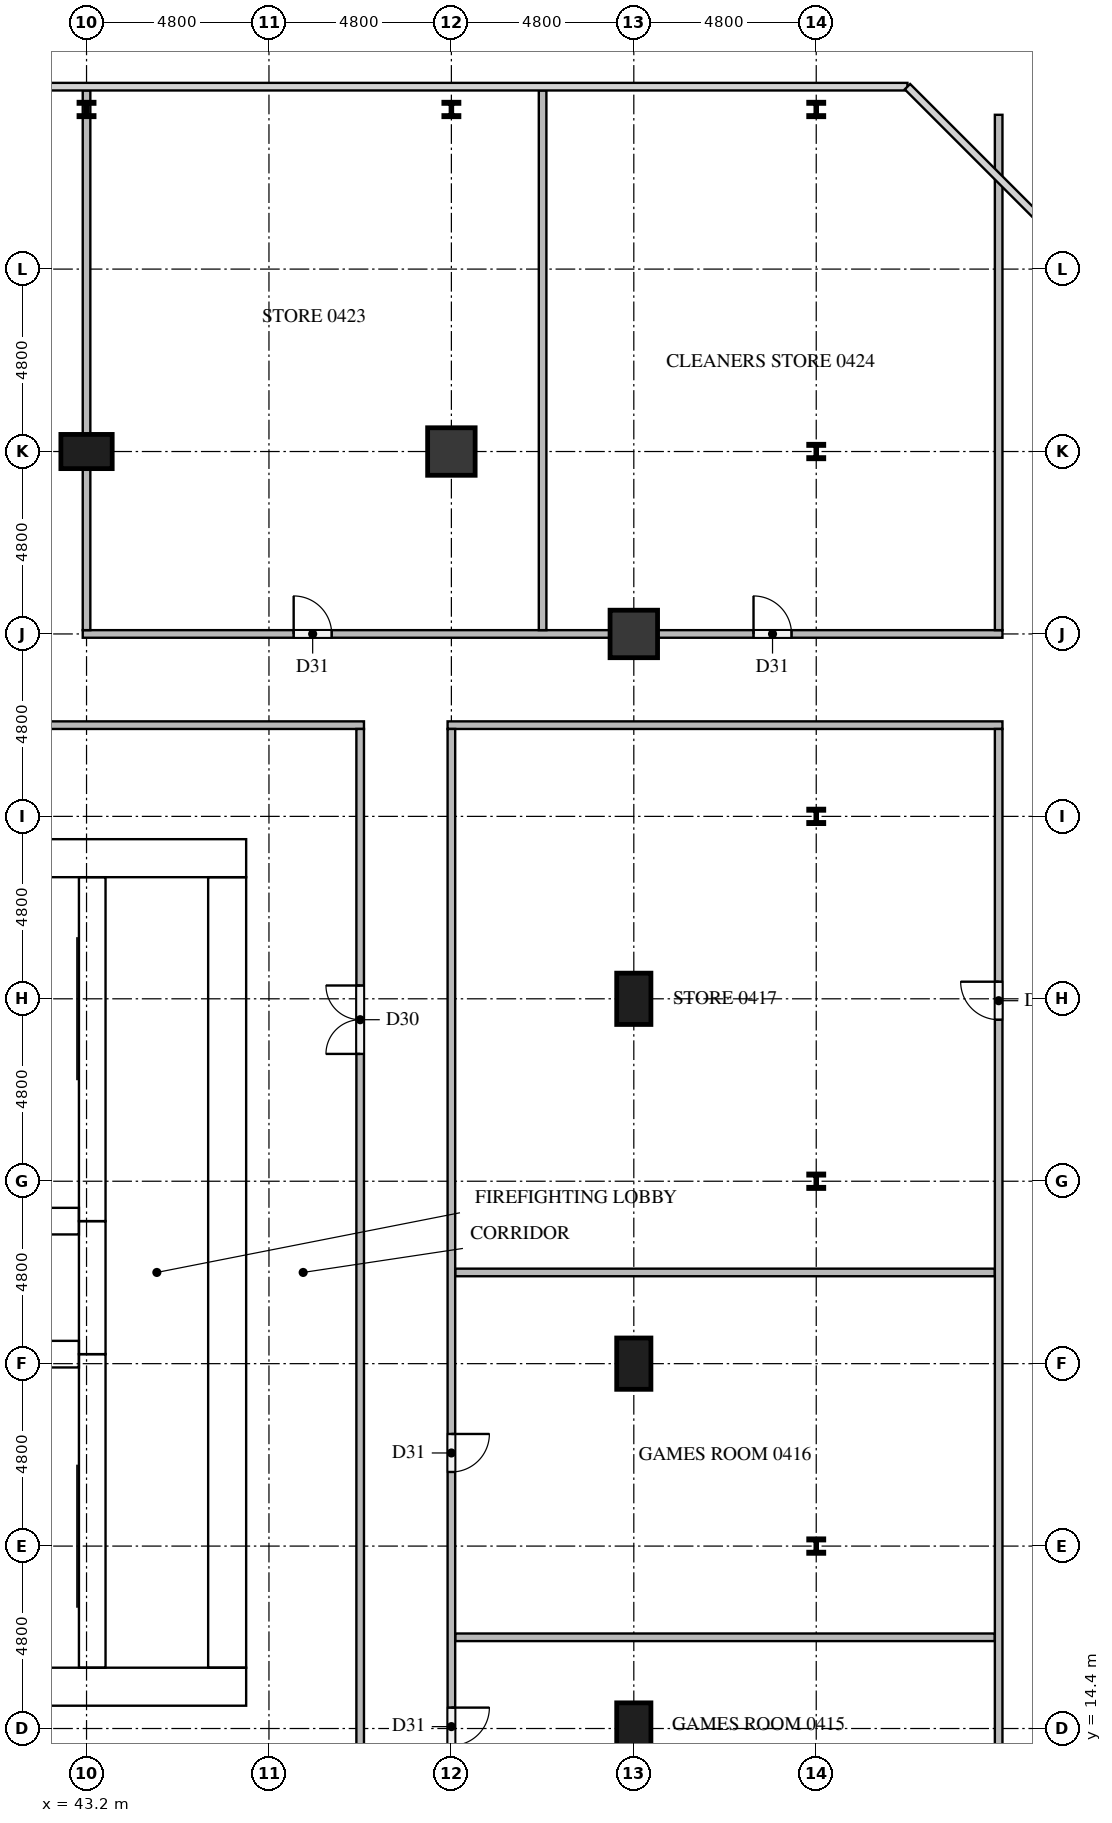
"""IFC4 building model, lengths in metres.
Left out: names, types, materials, properties, quantities, classifications, styles, units other than length and angle.
Written with IfcOpenShell. Run it as: python <this file> out.ifc"""

import sys

from ifc_helpers import new_model, si_unit, direction, frame, frame_2d, origin, origin_2d, place, context, subcontext, project, spatial, rectangle, i_section, extrude, element, fill, save


model = new_model("IFC4")
c1 = context("Model", 3, precision=1e-05, world=origin(), true_north=direction((0.0, 1.0)))
c2 = subcontext(c1, "Body", "Model", "MODEL_VIEW")
j1 = project(units=[si_unit("LENGTHUNIT", "METRE"), si_unit("PLANEANGLEUNIT", "RADIAN")], contexts=[c1])
p1 = place(None, origin())
s1 = spatial("IfcSite", under=j1, at=p1, CompositionType="ELEMENT")
p2 = place(p1, origin())
s2 = spatial("IfcBuilding", under=s1, at=p2, CompositionType="ELEMENT")
p3 = place(p2, frame((0.0, 0.0, 19.5)))
s3 = spatial("IfcBuildingStorey", under=s2, at=p3, CompositionType="ELEMENT", Elevation=19.5)
p4 = place(p3, frame((15.0, 15.5, 0.0), z_axis=(0.0, 0.0, 1.0), x_axis=(1.0, 0.0, 0.0)))
e1 = element("IfcWall", 1, at=p4, inside=s3, PredefinedType="SHEAR", context=c2, shape_type="SweptSolid", body=[
    extrude(rectangle(XDim=32.4, YDim=1.0, at=frame_2d((16.2, 0.0))), origin(), (0.0, 0.0, 1.0), 4.1),
])
p5 = place(p4, frame((15.3, 0.0, 0.0)))
e2 = element("IfcOpeningElement", 2, at=p5, cuts=e1, PredefinedType="OPENING", context=c2, shape_type="SweptSolid", body=[
    extrude(rectangle(XDim=1.8, YDim=2.1, at=frame_2d((0.9, 1.05))), frame((0.0, 0.51, 0.0), z_axis=(0.0, -1.0, 0.0), x_axis=(1.0, 0.0, 0.0)), (0.0, 0.0, 1.0), 1.02),
])
p6 = place(p3, frame((15.0, 37.3, 0.0), z_axis=(0.0, 0.0, 1.0), x_axis=(1.0, 0.0, 0.0)))
e3 = element("IfcWall", 3, at=p6, inside=s3, PredefinedType="SHEAR", context=c2, shape_type="SweptSolid", body=[
    extrude(rectangle(XDim=32.4, YDim=1.0, at=frame_2d((16.2, 0.0))), origin(), (0.0, 0.0, 1.0), 4.1),
])
p7 = place(p6, frame((15.3, 0.0, 0.0)))
e4 = element("IfcOpeningElement", 4, at=p7, cuts=e3, PredefinedType="OPENING", context=c2, shape_type="SweptSolid", body=[
    extrude(rectangle(XDim=1.8, YDim=2.1, at=frame_2d((0.9, 1.05))), frame((0.0, 0.51, 0.0), z_axis=(0.0, -1.0, 0.0), x_axis=(1.0, 0.0, 0.0)), (0.0, 0.0, 1.0), 1.02),
])
p8 = place(p6, frame((1.766, 0.0, 0.0)))
e5 = element("IfcOpeningElement", 5, at=p8, cuts=e3, PredefinedType="OPENING", context=c2, shape_type="SweptSolid", body=[
    extrude(rectangle(XDim=1.0, YDim=2.1, at=frame_2d((0.5, 1.05))), frame((0.0, 0.51, 0.0), z_axis=(0.0, -1.0, 0.0), x_axis=(1.0, 0.0, 0.0)), (0.0, 0.0, 1.0), 1.02),
])
p9 = place(p6, frame((5.241, 0.0, 0.0)))
e6 = element("IfcOpeningElement", 6, at=p9, cuts=e3, PredefinedType="OPENING", context=c2, shape_type="SweptSolid", body=[
    extrude(rectangle(XDim=1.0, YDim=2.1, at=frame_2d((0.5, 1.05))), frame((0.0, 0.51, 0.0), z_axis=(0.0, -1.0, 0.0), x_axis=(1.0, 0.0, 0.0)), (0.0, 0.0, 1.0), 1.02),
])
p10 = place(p3, frame((46.9, 16.0, 0.0), z_axis=(0.0, 0.0, 1.0), x_axis=(0.0, 1.0, 0.0)))
e7 = element("IfcWall", 7, at=p10, inside=s3, PredefinedType="SHEAR", context=c2, shape_type="SweptSolid", body=[
    extrude(rectangle(XDim=20.8, YDim=1.0, at=frame_2d((10.4, 0.0))), origin(), (0.0, 0.0, 1.0), 4.1),
])
p11 = place(p10, frame((10.1, 0.0, 0.0)))
e8 = element("IfcOpeningElement", 8, at=p11, cuts=e7, PredefinedType="OPENING", context=c2, shape_type="SweptSolid", body=[
    extrude(rectangle(XDim=1.2, YDim=2.1, at=frame_2d((0.6, 1.05))), frame((0.0, 0.51, 0.0), z_axis=(0.0, -1.0, 0.0), x_axis=(1.0, 0.0, 0.0)), (0.0, 0.0, 1.0), 1.02),
])
p12 = place(p3, frame((43.35, 16.0, 0.0), z_axis=(0.0, 0.0, 1.0), x_axis=(0.0, 1.0, 0.0)))
e9 = element("IfcWall", 9, at=p12, inside=s3, PredefinedType="SHEAR", context=c2, shape_type="SweptSolid", body=[
    extrude(rectangle(XDim=8.25, YDim=0.7, at=frame_2d((4.125, 0.0))), origin(), (0.0, 0.0, 1.0), 4.1),
])
p13 = place(p12, frame((0.2, 0.0, 0.0)))
e10 = element("IfcOpeningElement", 10, at=p13, cuts=e9, PredefinedType="OPENING", context=c2, shape_type="SweptSolid", body=[
    extrude(rectangle(XDim=1.2, YDim=2.1, at=frame_2d((0.6, 1.05))), frame((0.0, 0.36, 0.0), z_axis=(0.0, -1.0, 0.0), x_axis=(1.0, 0.0, 0.0)), (0.0, 0.0, 1.0), 0.72),
])
p14 = place(p3, frame((43.35, 24.25, 0.0), z_axis=(0.0, 0.0, 1.0), x_axis=(0.0, 1.0, 0.0)))
e11 = element("IfcWall", 11, at=p14, inside=s3, PredefinedType="SHEAR", context=c2, shape_type="SweptSolid", body=[
    extrude(rectangle(XDim=3.5, YDim=0.7, at=frame_2d((1.75, 0.0))), origin(), (0.0, 0.0, 1.0), 4.1),
])
p15 = place(p14, frame((1.2, 0.0, 0.0)))
e12 = element("IfcOpeningElement", 12, at=p15, cuts=e11, PredefinedType="OPENING", context=c2, shape_type="SweptSolid", body=[
    extrude(rectangle(XDim=1.1, YDim=2.1, at=frame_2d((0.55, 1.05))), frame((0.0, 0.36, 0.0), z_axis=(0.0, -1.0, 0.0), x_axis=(1.0, 0.0, 0.0)), (0.0, 0.0, 1.0), 0.72),
])
p16 = place(p3, frame((43.35, 27.75, 0.0), z_axis=(0.0, 0.0, 1.0), x_axis=(0.0, 1.0, 0.0)))
e13 = element("IfcWall", 13, at=p16, inside=s3, PredefinedType="SHEAR", context=c2, shape_type="SweptSolid", body=[
    extrude(rectangle(XDim=9.05, YDim=0.7, at=frame_2d((4.525, 0.0))), origin(), (0.0, 0.0, 1.0), 4.1),
])
p17 = place(p16, frame((7.65, 0.0, 0.0)))
e14 = element("IfcOpeningElement", 14, at=p17, cuts=e13, PredefinedType="OPENING", context=c2, shape_type="SweptSolid", body=[
    extrude(rectangle(XDim=1.2, YDim=2.1, at=frame_2d((0.6, 1.05))), frame((0.0, 0.36, 0.0), z_axis=(0.0, -1.0, 0.0), x_axis=(1.0, 0.0, 0.0)), (0.0, 0.0, 1.0), 0.72),
])
for number, where, z_axis, x_axis in (
    (15, (39.65, 24.25, 0.0), (0.0, 0.0, 1.0), (1.0, 0.0, 0.0)),
    (16, (39.65, 27.75, 0.0), (0.0, 0.0, 1.0), (1.0, 0.0, 0.0)),
):
    element("IfcWall", number, at=place(p3, frame(where, z_axis=z_axis, x_axis=x_axis)), inside=s3, PredefinedType="SHEAR", context=c2, shape_type="SweptSolid", body=[
        extrude(rectangle(XDim=3.35, YDim=0.7, at=frame_2d((1.675, 0.0))), origin(), (0.0, 0.0, 1.0), 4.1),
    ])
for number, where, z_axis, x_axis in (
    (17, (57.6, 14.4, 0.0), (0.0, 0.0, 1.0), (0.0, 1.0, 0.0)),
    (18, (57.6, 24.0, 0.0), (0.0, 0.0, 1.0), (0.0, 1.0, 0.0)),
    (19, (57.6, 33.6, 0.0), (0.0, 0.0, 1.0), (0.0, 1.0, 0.0)),
):
    element("IfcColumn", number, at=place(p3, frame(where, z_axis=z_axis, x_axis=x_axis)), inside=s3, PredefinedType="COLUMN", context=c2, shape_type="SweptSolid", body=[
        extrude(rectangle(XDim=1.35, YDim=0.9, at=origin_2d()), origin(), (0.0, 0.0, 1.0), 4.1),
    ])
for number, where, z_axis, x_axis in (
    (20, (57.6, 43.2, 0.0), (0.0, 0.0, 1.0), (1.0, 0.0, 0.0)),
    (21, (52.8, 48.0, 0.0), (0.0, 0.0, 1.0), (1.0, 0.0, 0.0)),
):
    element("IfcColumn", number, at=place(p3, frame(where, z_axis=z_axis, x_axis=x_axis)), inside=s3, PredefinedType="COLUMN", context=c2, shape_type="SweptSolid", body=[
        extrude(rectangle(XDim=1.25, YDim=1.25, at=origin_2d()), origin(), (0.0, 0.0, 1.0), 4.1),
    ])
p18 = place(p3, frame((43.2, 48.0, 0.0), z_axis=(0.0, 0.0, 1.0), x_axis=(1.0, 0.0, 0.0)))
e22 = element("IfcColumn", 22, at=p18, inside=s3, PredefinedType="COLUMN", context=c2, shape_type="SweptSolid", body=[
    extrude(rectangle(XDim=1.35, YDim=0.9, at=origin_2d()), origin(), (0.0, 0.0, 1.0), 4.1),
])
for number, where, z_axis, x_axis in (
    (23, (43.2, 57.0, 0.0), (0.0, 0.0, 1.0), (1.0, 0.0, 0.0)),
    (24, (52.8, 57.0, 0.0), (0.0, 0.0, 1.0), (1.0, 0.0, 0.0)),
    (25, (62.4, 19.2, 0.0), (0.0, 0.0, 1.0), (1.0, 0.0, 0.0)),
    (26, (62.4, 28.8, 0.0), (0.0, 0.0, 1.0), (1.0, 0.0, 0.0)),
    (27, (62.4, 38.4, 0.0), (0.0, 0.0, 1.0), (1.0, 0.0, 0.0)),
    (28, (62.4, 48.0, 0.0), (0.0, 0.0, 1.0), (1.0, 0.0, 0.0)),
    (29, (62.4, 57.0, 0.0), (0.0, 0.0, 1.0), (1.0, 0.0, 0.0)),
):
    element("IfcColumn", number, at=place(p3, frame(where, z_axis=z_axis, x_axis=x_axis)), inside=s3, PredefinedType="COLUMN", context=c2, shape_type="SweptSolid", body=[
        extrude(i_section(OverallWidth=0.396, OverallDepth=0.381, WebThickness=0.019, FlangeThickness=0.03, at=origin_2d()), origin(), (0.0, 0.0, 1.0), 4.1),
    ])
for number, where, z_axis, x_axis in (
    (30, (52.9, 16.8, 0.0), (0.0, 0.0, 1.0), (1.0, 0.0, 0.0)),
    (31, (52.9, 26.4, 0.0), (0.0, 0.0, 1.0), (1.0, 0.0, 0.0)),
):
    element("IfcWall", number, at=place(p3, frame(where, z_axis=z_axis, x_axis=x_axis)), inside=s3, PredefinedType="PARTITIONING", context=c2, shape_type="SweptSolid", body=[
        extrude(rectangle(XDim=14.2, YDim=0.2, at=frame_2d((7.1, 0.0))), origin(), (0.0, 0.0, 1.0), 4.1),
    ])
p19 = place(p3, frame((50.5, 40.8, 0.0), z_axis=(0.0, 0.0, 1.0), x_axis=(-1.0, 0.0, 0.0)))
e32 = element("IfcWall", 32, at=p19, inside=s3, PredefinedType="PARTITIONING", context=c2, shape_type="SweptSolid", body=[
    extrude(rectangle(XDim=38.6, YDim=0.2, at=frame_2d((19.3, 0.0))), origin(), (0.0, 0.0, 1.0), 4.1),
])
p20 = place(p19, frame((18.45, 0.0, 0.0)))
e33 = element("IfcOpeningElement", 33, at=p20, cuts=e32, PredefinedType="OPENING", context=c2, shape_type="SweptSolid", body=[
    extrude(rectangle(XDim=1.8, YDim=2.1, at=frame_2d((0.9, 1.05))), frame((0.0, 0.11, 0.0), z_axis=(0.0, -1.0, 0.0), x_axis=(1.0, 0.0, 0.0)), (0.0, 0.0, 1.0), 0.22),
])
p21 = place(p19, frame((16.25, 0.0, 0.0)))
e34 = element("IfcOpeningElement", 34, at=p21, cuts=e32, PredefinedType="OPENING", context=c2, shape_type="SweptSolid", body=[
    extrude(rectangle(XDim=1.8, YDim=2.1, at=frame_2d((0.9, 1.05))), frame((0.0, 0.11, 0.0), z_axis=(0.0, -1.0, 0.0), x_axis=(1.0, 0.0, 0.0)), (0.0, 0.0, 1.0), 0.22),
])
p22 = place(p3, frame((52.7, 40.8, 0.0), z_axis=(0.0, 0.0, 1.0), x_axis=(1.0, 0.0, 0.0)))
e35 = element("IfcWall", 35, at=p22, inside=s3, PredefinedType="PARTITIONING", context=c2, shape_type="SweptSolid", body=[
    extrude(rectangle(XDim=14.6, YDim=0.2, at=frame_2d((7.3, 0.0))), origin(), (0.0, 0.0, 1.0), 4.1),
])
p23 = place(p3, frame((43.1, 43.2, 0.0), z_axis=(0.0, 0.0, 1.0), x_axis=(1.0, 0.0, 0.0)))
e36 = element("IfcWall", 36, at=p23, inside=s3, PredefinedType="PARTITIONING", context=c2, shape_type="SweptSolid", body=[
    extrude(rectangle(XDim=24.2, YDim=0.2, at=frame_2d((12.1, 0.0))), origin(), (0.0, 0.0, 1.0), 4.1),
])
p24 = place(p23, frame((5.55, 0.0, 0.0)))
e37 = element("IfcOpeningElement", 37, at=p24, cuts=e36, PredefinedType="OPENING", context=c2, shape_type="SweptSolid", body=[
    extrude(rectangle(XDim=1.0, YDim=2.1, at=frame_2d((0.5, 1.05))), frame((0.0, 0.11, 0.0), z_axis=(0.0, -1.0, 0.0), x_axis=(1.0, 0.0, 0.0)), (0.0, 0.0, 1.0), 0.22),
])
p25 = place(p23, frame((17.65, 0.0, 0.0)))
e38 = element("IfcOpeningElement", 38, at=p25, cuts=e36, PredefinedType="OPENING", context=c2, shape_type="SweptSolid", body=[
    extrude(rectangle(XDim=1.0, YDim=2.1, at=frame_2d((0.5, 1.05))), frame((0.0, 0.11, 0.0), z_axis=(0.0, -1.0, 0.0), x_axis=(1.0, 0.0, 0.0)), (0.0, 0.0, 1.0), 0.22),
])
p26 = place(p3, frame((43.2, 43.3, 0.0), z_axis=(0.0, 0.0, 1.0), x_axis=(0.0, 1.0, 0.0)))
e39 = element("IfcWall", 39, at=p26, inside=s3, PredefinedType="PARTITIONING", context=c2, shape_type="SweptSolid", body=[
    extrude(rectangle(XDim=14.2, YDim=0.2, at=frame_2d((7.1, 0.0))), origin(), (0.0, 0.0, 1.0), 4.1),
])
p27 = place(p3, frame((50.4, 12.1, 0.0), z_axis=(0.0, 0.0, 1.0), x_axis=(0.0, 1.0, 0.0)))
e40 = element("IfcWall", 40, at=p27, inside=s3, PredefinedType="PARTITIONING", context=c2, shape_type="SweptSolid", body=[
    extrude(rectangle(XDim=28.6, YDim=0.2, at=frame_2d((14.3, 0.0))), origin(), (0.0, 0.0, 1.0), 4.1),
])
p28 = place(p27, frame((20.05, 0.0, 0.0)))
e41 = element("IfcOpeningElement", 41, at=p28, cuts=e40, PredefinedType="OPENING", context=c2, shape_type="SweptSolid", body=[
    extrude(rectangle(XDim=1.8, YDim=2.1, at=frame_2d((0.9, 1.05))), frame((0.0, 0.11, 0.0), z_axis=(0.0, -1.0, 0.0), x_axis=(1.0, 0.0, 0.0)), (0.0, 0.0, 1.0), 0.22),
])
p29 = place(p3, frame((52.8, 40.7, 0.0), z_axis=(0.0, 0.0, 1.0), x_axis=(0.0, -1.0, 0.0)))
e42 = element("IfcWall", 42, at=p29, inside=s3, PredefinedType="PARTITIONING", context=c2, shape_type="SweptSolid", body=[
    extrude(rectangle(XDim=28.6, YDim=0.2, at=frame_2d((14.3, 0.0))), origin(), (0.0, 0.0, 1.0), 4.1),
])
p30 = place(p29, frame((25.75, 0.0, 0.0)))
e43 = element("IfcOpeningElement", 43, at=p30, cuts=e42, PredefinedType="OPENING", context=c2, shape_type="SweptSolid", body=[
    extrude(rectangle(XDim=1.0, YDim=2.1, at=frame_2d((0.5, 1.05))), frame((0.0, 0.11, 0.0), z_axis=(0.0, -1.0, 0.0), x_axis=(1.0, 0.0, 0.0)), (0.0, 0.0, 1.0), 0.22),
])
p31 = place(p29, frame((18.55, 0.0, 0.0)))
e44 = element("IfcOpeningElement", 44, at=p31, cuts=e42, PredefinedType="OPENING", context=c2, shape_type="SweptSolid", body=[
    extrude(rectangle(XDim=1.0, YDim=2.1, at=frame_2d((0.5, 1.05))), frame((0.0, 0.11, 0.0), z_axis=(0.0, -1.0, 0.0), x_axis=(1.0, 0.0, 0.0)), (0.0, 0.0, 1.0), 0.22),
])
p32 = place(p3, frame((55.2, 43.3, 0.0), z_axis=(0.0, 0.0, 1.0), x_axis=(0.0, 1.0, 0.0)))
e45 = element("IfcWall", 45, at=p32, inside=s3, PredefinedType="PARTITIONING", context=c2, shape_type="SweptSolid", body=[
    extrude(rectangle(XDim=14.2, YDim=0.2, at=frame_2d((7.1, 0.0))), origin(), (0.0, 0.0, 1.0), 4.1),
])
p33 = place(p3, frame((67.2, 12.4, 0.0), z_axis=(0.0, 0.0, 1.0), x_axis=(0.0, 1.0, 0.0)))
e46 = element("IfcWall", 46, at=p33, inside=s3, PredefinedType="PARTITIONING", context=c2, shape_type="SweptSolid", body=[
    extrude(rectangle(XDim=28.3, YDim=0.2, at=frame_2d((14.15, 0.0))), origin(), (0.0, 0.0, 1.0), 4.1),
])
p34 = place(p33, frame((20.65, 0.0, 0.0)))
e47 = element("IfcOpeningElement", 47, at=p34, cuts=e46, PredefinedType="OPENING", context=c2, shape_type="SweptSolid", body=[
    extrude(rectangle(XDim=1.0, YDim=2.1, at=frame_2d((0.5, 1.05))), frame((0.0, 0.11, 0.0), z_axis=(0.0, -1.0, 0.0), x_axis=(1.0, 0.0, 0.0)), (0.0, 0.0, 1.0), 0.22),
])
p35 = place(p3, frame((67.2, 43.3, 0.0), z_axis=(0.0, 0.0, 1.0), x_axis=(0.0, 1.0, 0.0)))
e48 = element("IfcWall", 48, at=p35, inside=s3, PredefinedType="PARTITIONING", context=c2, shape_type="SweptSolid", body=[
    extrude(rectangle(XDim=13.56, YDim=0.2, at=frame_2d((6.78, 0.0))), origin(), (0.0, 0.0, 1.0), 4.1),
])
p36 = place(p15, origin())
e49 = element("IfcDoor", 49, at=p36, inside=s3, OperationType="DOUBLE_DOOR_SLIDING", PredefinedType="DOOR", context=c2, shape_type="SweptSolid", body=[
    extrude(rectangle(XDim=1.1, YDim=2.1, at=frame_2d((0.55, 1.05))), frame((0.0, 0.025, 0.0), z_axis=(0.0, -1.0, 0.0), x_axis=(1.0, 0.0, 0.0)), (0.0, 0.0, 1.0), 0.05),
])
fill(e12, e49)
p37 = place(p13, origin())
e50 = element("IfcDoor", 50, at=p37, inside=s3, OperationType="SINGLE_SWING_LEFT", PredefinedType="DOOR", context=c2, shape_type="SweptSolid", body=[
    extrude(rectangle(XDim=1.2, YDim=2.1, at=frame_2d((0.6, 1.05))), frame((0.0, 0.025, 0.0), z_axis=(0.0, -1.0, 0.0), x_axis=(1.0, 0.0, 0.0)), (0.0, 0.0, 1.0), 0.05),
])
fill(e10, e50)
p38 = place(p17, origin())
e51 = element("IfcDoor", 51, at=p38, inside=s3, OperationType="SINGLE_SWING_RIGHT", PredefinedType="DOOR", context=c2, shape_type="SweptSolid", body=[
    extrude(rectangle(XDim=1.2, YDim=2.1, at=frame_2d((0.6, 1.05))), frame((0.0, 0.025, 0.0), z_axis=(0.0, -1.0, 0.0), x_axis=(1.0, 0.0, 0.0)), (0.0, 0.0, 1.0), 0.05),
])
fill(e14, e51)
p39 = place(p11, origin())
e52 = element("IfcDoor", 52, at=p39, inside=s3, OperationType="SINGLE_SWING_RIGHT", PredefinedType="DOOR", context=c2, shape_type="SweptSolid", body=[
    extrude(rectangle(XDim=1.2, YDim=2.1, at=frame_2d((0.6, 1.05))), frame((0.0, 0.025, 0.0), z_axis=(0.0, -1.0, 0.0), x_axis=(1.0, 0.0, 0.0)), (0.0, 0.0, 1.0), 0.05),
])
fill(e8, e52)
p40 = place(p30, origin())
e53 = element("IfcDoor", 53, at=p40, inside=s3, OperationType="SINGLE_SWING_LEFT", PredefinedType="DOOR", context=c2, shape_type="SweptSolid", body=[
    extrude(rectangle(XDim=1.0, YDim=2.1, at=frame_2d((0.5, 1.05))), frame((0.0, 0.025, 0.0), z_axis=(0.0, -1.0, 0.0), x_axis=(1.0, 0.0, 0.0)), (0.0, 0.0, 1.0), 0.05),
])
fill(e43, e53)
p41 = place(p31, origin())
e54 = element("IfcDoor", 54, at=p41, inside=s3, OperationType="SINGLE_SWING_LEFT", PredefinedType="DOOR", context=c2, shape_type="SweptSolid", body=[
    extrude(rectangle(XDim=1.0, YDim=2.1, at=frame_2d((0.5, 1.05))), frame((0.0, 0.025, 0.0), z_axis=(0.0, -1.0, 0.0), x_axis=(1.0, 0.0, 0.0)), (0.0, 0.0, 1.0), 0.05),
])
fill(e44, e54)
p42 = place(p34, origin())
e55 = element("IfcDoor", 55, at=p42, inside=s3, OperationType="SINGLE_SWING_RIGHT", PredefinedType="DOOR", context=c2, shape_type="SweptSolid", body=[
    extrude(rectangle(XDim=1.0, YDim=2.1, at=frame_2d((0.5, 1.05))), frame((0.0, 0.025, 0.0), z_axis=(0.0, -1.0, 0.0), x_axis=(1.0, 0.0, 0.0)), (0.0, 0.0, 1.0), 0.05),
])
fill(e47, e55)
p43 = place(p24, origin())
e56 = element("IfcDoor", 56, at=p43, inside=s3, OperationType="SINGLE_SWING_LEFT", PredefinedType="DOOR", context=c2, shape_type="SweptSolid", body=[
    extrude(rectangle(XDim=1.0, YDim=2.1, at=frame_2d((0.5, 1.05))), frame((0.0, 0.025, 0.0), z_axis=(0.0, -1.0, 0.0), x_axis=(1.0, 0.0, 0.0)), (0.0, 0.0, 1.0), 0.05),
])
fill(e37, e56)
p44 = place(p25, origin())
e57 = element("IfcDoor", 57, at=p44, inside=s3, OperationType="SINGLE_SWING_LEFT", PredefinedType="DOOR", context=c2, shape_type="SweptSolid", body=[
    extrude(rectangle(XDim=1.0, YDim=2.1, at=frame_2d((0.5, 1.05))), frame((0.0, 0.025, 0.0), z_axis=(0.0, -1.0, 0.0), x_axis=(1.0, 0.0, 0.0)), (0.0, 0.0, 1.0), 0.05),
])
fill(e38, e57)
p45 = place(p28, origin())
e58 = element("IfcDoor", 58, at=p45, inside=s3, OperationType="DOUBLE_DOOR_SINGLE_SWING", PredefinedType="DOOR", context=c2, shape_type="SweptSolid", body=[
    extrude(rectangle(XDim=1.8, YDim=2.1, at=frame_2d((0.9, 1.05))), frame((0.0, 0.025, 0.0), z_axis=(0.0, -1.0, 0.0), x_axis=(1.0, 0.0, 0.0)), (0.0, 0.0, 1.0), 0.05),
])
fill(e41, e58)
save(model, sys.argv[1])
